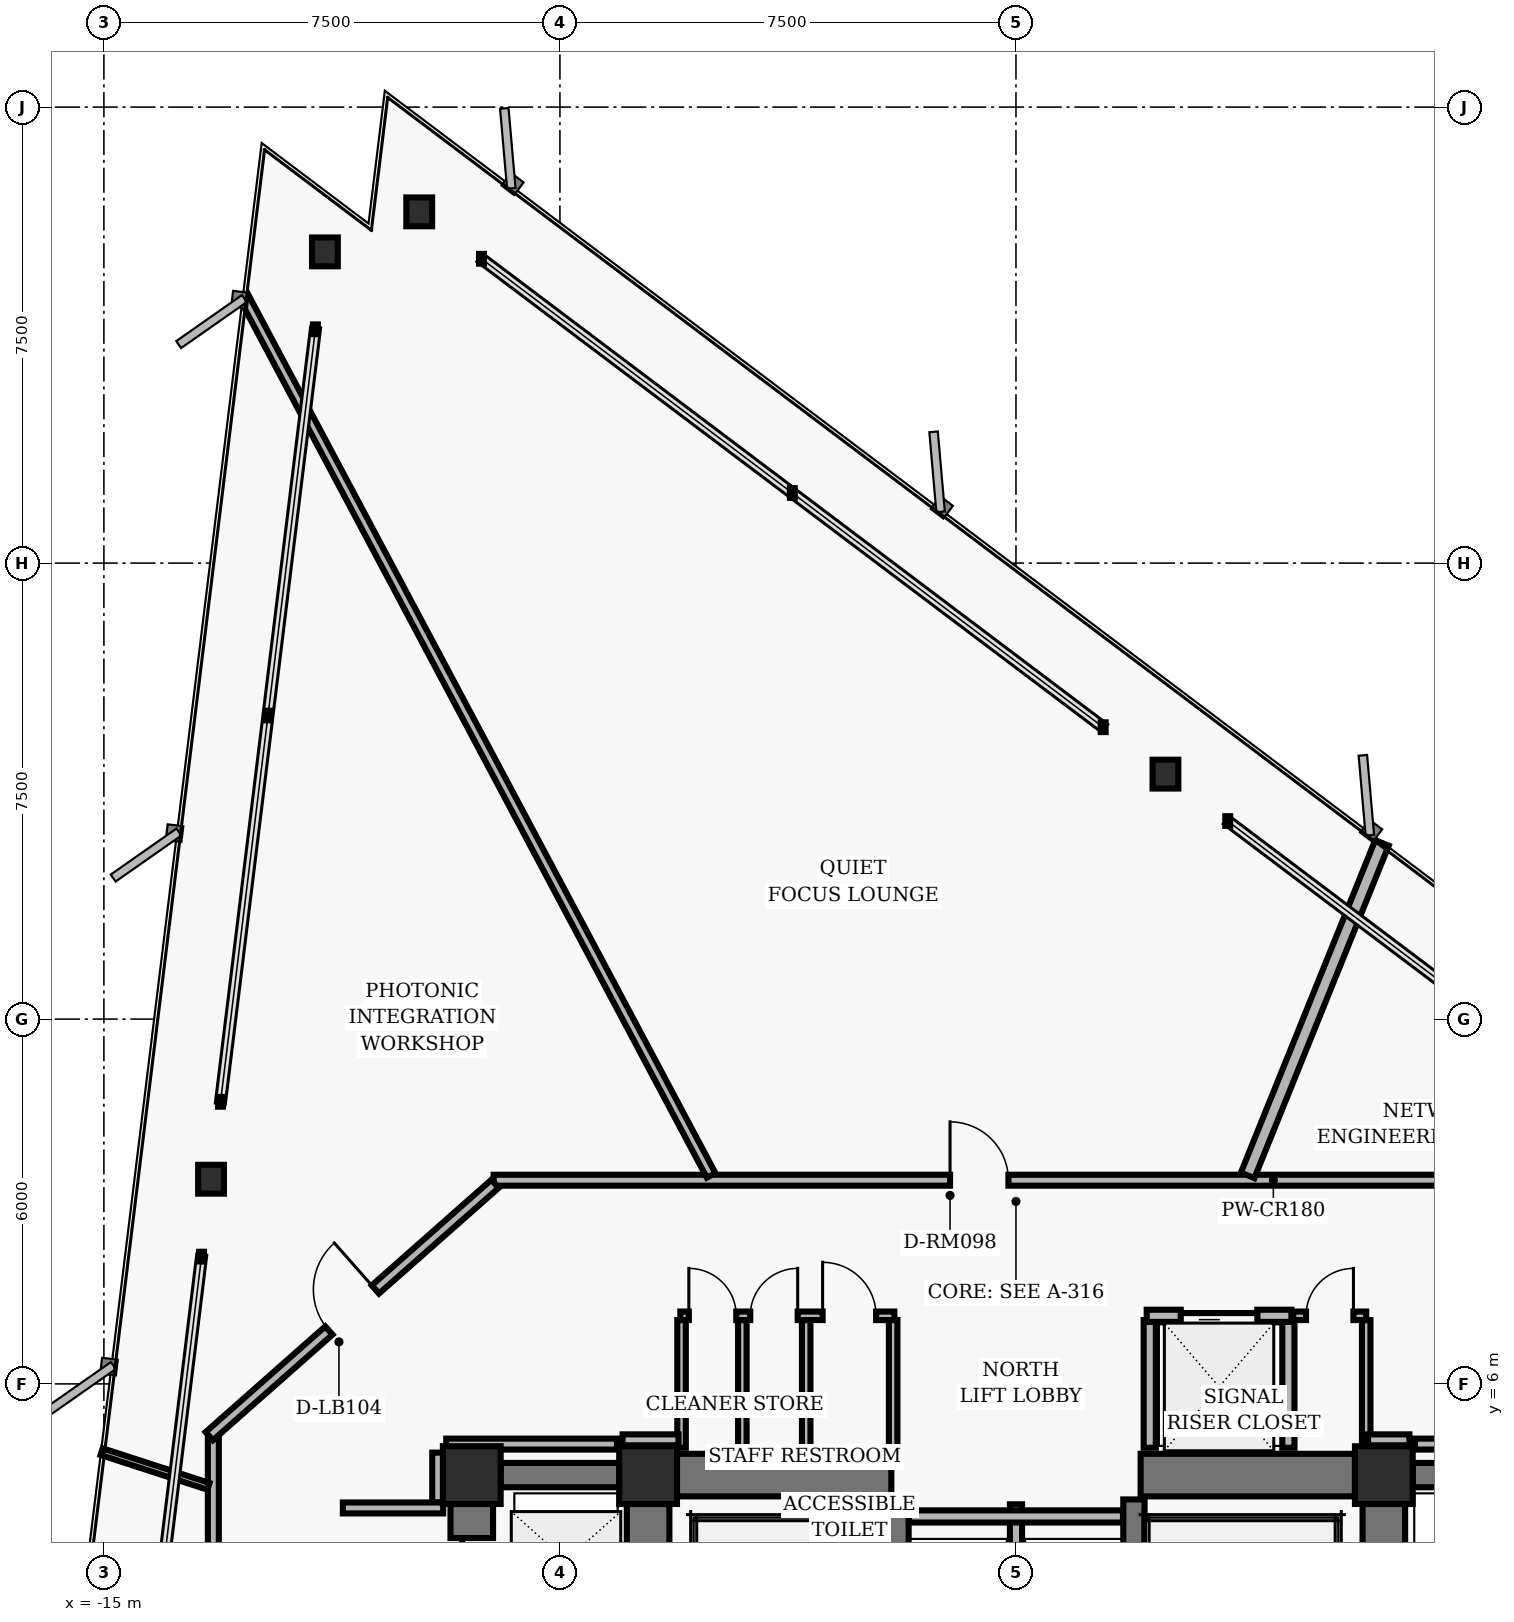
"""IFC4 building model, lengths in metres.
Left out: names, types, materials, properties, quantities, classifications, styles, units other than length and angle.
Written with IfcOpenShell. Run it as: python <this file> out.ifc"""

import sys

from ifc_helpers import new_model, si_unit, direction, frame, frame_2d, origin, origin_2d, place, context, subcontext, project, spatial, rectangle, hollow_rectangle, i_section, extrude, element, fill, save


model = new_model("IFC4")
c1 = context("Model", 3, precision=1e-05, world=origin(), true_north=direction((0.0, 1.0)))
c2 = subcontext(c1, "Body", "Model", "MODEL_VIEW")
j1 = project(units=[si_unit("LENGTHUNIT", "METRE"), si_unit("PLANEANGLEUNIT", "RADIAN")], contexts=[c1])
p1 = place(None, origin())
s1 = spatial("IfcSite", under=j1, at=p1, CompositionType="ELEMENT")
p2 = place(p1, origin())
s2 = spatial("IfcBuilding", under=s1, at=p2, CompositionType="ELEMENT")
p3 = place(p2, frame((0.0, 0.0, 52.96)))
s3 = spatial("IfcBuildingStorey", under=s2, at=p3, CompositionType="ELEMENT", Elevation=52.96)
for number, where, z_axis, x_axis in (
    (1, (-6.05, 4.5, 0.0), (0.0, 0.0, 1.0), (1.0, 0.0, 0.0)),
    (2, (6.05, 4.5, 0.0), (0.0, 0.0, 1.0), (1.0, 0.0, 0.0)),
    (3, (-8.95, 4.5, 0.0), (0.0, 0.0, 1.0), (1.0, 0.0, 0.0)),
):
    element("IfcColumn", number, at=place(p3, frame(where, z_axis=z_axis, x_axis=x_axis)), inside=s3, PredefinedType="COLUMN", context=c2, shape_type="SweptSolid", body=[
        extrude(hollow_rectangle(XDim=0.95, YDim=0.95, WallThickness=0.06, InnerFilletRadius=0.02, OuterFilletRadius=0.04, at=origin_2d()), origin(), (0.0, 0.0, 1.0), 3.36),
    ])
for number, where, z_axis, x_axis in (
    (4, (-6.05, 0.475, 0.0), (0.0, 0.0, 1.0), (0.0, 1.0, 0.0)),
    (5, (6.05, 0.475, 0.0), (0.0, 0.0, 1.0), (0.0, 1.0, 0.0)),
):
    element("IfcWall", number, at=place(p3, frame(where, z_axis=z_axis, x_axis=x_axis)), inside=s3, PredefinedType="SHEAR", context=c2, shape_type="SweptSolid", body=[
        extrude(rectangle(XDim=3.55, YDim=0.7, at=frame_2d((1.775, 0.0))), origin(), (0.0, 0.0, 1.0), 3.098),
    ])
for number, where, z_axis, x_axis in (
    (6, (-1.94, -4.1, 0.0), (0.0, 0.0, 1.0), (0.0, 1.0, 0.0)),
    (7, (1.94, -4.1, 0.0), (0.0, 0.0, 1.0), (0.0, 1.0, 0.0)),
):
    element("IfcWall", number, at=place(p3, frame(where, z_axis=z_axis, x_axis=x_axis)), inside=s3, PredefinedType="SHEAR", context=c2, shape_type="SweptSolid", body=[
        extrude(rectangle(XDim=8.2, YDim=0.35, at=frame_2d((4.1, 0.0))), origin(), (0.0, 0.0, 1.0), 3.098),
    ])
for number, where, z_axis, x_axis in (
    (8, (-5.575, 4.5, 0.0), (0.0, 0.0, 1.0), (1.0, 0.0, 0.0)),
    (9, (2.05, 4.5, 0.0), (0.0, 0.0, 1.0), (1.0, 0.0, 0.0)),
):
    element("IfcWall", number, at=place(p3, frame(where, z_axis=z_axis, x_axis=x_axis)), inside=s3, PredefinedType="SHEAR", context=c2, shape_type="SweptSolid", body=[
        extrude(rectangle(XDim=3.525, YDim=0.7, at=frame_2d((1.762, 0.0))), origin(), (0.0, 0.0, 1.0), 3.098),
    ])
p4 = place(p3, frame((-8.95, -3.825, 0.0), z_axis=(0.0, 0.0, 1.0), x_axis=(0.0, 1.0, 0.0)))
e10 = element("IfcWall", 10, at=p4, inside=s3, PredefinedType="SHEAR", context=c2, shape_type="SweptSolid", body=[
    extrude(rectangle(XDim=7.85, YDim=0.7, at=frame_2d((3.925, 0.0))), origin(), (0.0, 0.0, 1.0), 3.098),
])
p5 = place(p4, frame((0.55, 0.0, 0.0)))
e11 = element("IfcOpeningElement", 11, at=p5, cuts=e10, PredefinedType="OPENING", context=c2, shape_type="SweptSolid", body=[
    extrude(rectangle(XDim=1.06, YDim=2.04, at=frame_2d((0.53, 1.02))), frame((0.0, 0.36, 0.0), z_axis=(0.0, -1.0, 0.0), x_axis=(1.0, 0.0, 0.0)), (0.0, 0.0, 1.0), 0.72),
])
p6 = place(p4, frame((3.395, 0.0, 0.0)))
e12 = element("IfcOpeningElement", 12, at=p6, cuts=e10, PredefinedType="OPENING", context=c2, shape_type="SweptSolid", body=[
    extrude(rectangle(XDim=1.06, YDim=2.04, at=frame_2d((0.53, 1.02))), frame((0.0, 0.36, 0.0), z_axis=(0.0, -1.0, 0.0), x_axis=(1.0, 0.0, 0.0)), (0.0, 0.0, 1.0), 0.72),
])
p7 = place(p4, frame((6.23, 0.0, 0.0)))
e13 = element("IfcOpeningElement", 13, at=p7, cuts=e10, PredefinedType="OPENING", context=c2, shape_type="SweptSolid", body=[
    extrude(rectangle(XDim=1.06, YDim=2.04, at=frame_2d((0.53, 1.02))), frame((0.0, 0.36, 0.0), z_axis=(0.0, -1.0, 0.0), x_axis=(1.0, 0.0, 0.0)), (0.0, 0.0, 1.0), 0.72),
])
for number, where, z_axis, x_axis in (
    (14, (-8.475, 4.5, 0.0), (0.0, 0.0, 1.0), (1.0, 0.0, 0.0)),
    (15, (6.525, 4.5, 0.0), (0.0, 0.0, 1.0), (1.0, 0.0, 0.0)),
):
    element("IfcWall", number, at=place(p3, frame(where, z_axis=z_axis, x_axis=x_axis)), inside=s3, PredefinedType="SHEAR", context=c2, shape_type="SweptSolid", body=[
        extrude(rectangle(XDim=1.95, YDim=0.4, at=frame_2d((0.975, 0.0))), origin(), (0.0, 0.0, 1.0), 3.098),
    ])
for number, where, z_axis, x_axis in (
    (16, (2.458, 16.029, 0.0), (0.0, 0.0, 1.0), (1.0, 0.0, 0.0)),
    (17, (-9.814, 25.277, 0.0), (0.0, 0.0, 1.0), (1.0, 0.0, 0.0)),
    (18, (-11.365, 24.619, 0.0), (0.0, 0.0, 1.0), (1.0, 0.0, 0.0)),
    (19, (-13.238, 9.366, 0.0), (0.0, 0.0, 1.0), (1.0, 0.0, 0.0)),
):
    element("IfcColumn", number, at=place(p3, frame(where, z_axis=z_axis, x_axis=x_axis)), inside=s3, PredefinedType="COLUMN", context=c2, shape_type="SweptSolid", body=[
        extrude(i_section(OverallWidth=0.424, OverallDepth=0.474, WebThickness=0.048, FlangeThickness=0.077, FilletRadius=0.025, at=origin_2d()), origin(), (0.0, 0.0, 1.0), 3.36),
    ])
p8 = place(p3, frame((0.0, 1.25, 0.0), z_axis=(0.0, 0.0, 1.0), x_axis=(0.0, 1.0, 0.0)))
e20 = element("IfcWall", 20, at=p8, inside=s3, PredefinedType="PARTITIONING", context=c2, shape_type="SweptSolid", body=[
    extrude(rectangle(XDim=2.77, YDim=0.2, at=frame_2d((1.385, 0.0))), origin(), (0.0, 0.0, 1.0), 3.073),
])
p9 = place(p3, frame((-1.76, 3.82, 0.0), z_axis=(0.0, 0.0, 1.0), x_axis=(1.0, 0.0, 0.0)))
e21 = element("IfcWall", 21, at=p9, inside=s3, PredefinedType="PARTITIONING", context=c2, shape_type="SweptSolid", body=[
    extrude(rectangle(XDim=3.52, YDim=0.2, at=frame_2d((1.76, 0.0))), origin(), (0.0, 0.0, 1.0), 3.073),
])
for number, where, z_axis, x_axis in (
    (22, (2.2, 4.95, 0.0), (0.0, 0.0, 1.0), (0.0, 1.0, 0.0)),
    (23, (4.48, 4.95, 0.0), (0.0, 0.0, 1.0), (0.0, 1.0, 0.0)),
):
    element("IfcWall", number, at=place(p3, frame(where, z_axis=z_axis, x_axis=x_axis)), inside=s3, PredefinedType="PARTITIONING", context=c2, shape_type="SweptSolid", body=[
        extrude(rectangle(XDim=2.1, YDim=0.2, at=frame_2d((1.05, 0.0))), origin(), (0.0, 0.0, 1.0), 3.073),
    ])
p10 = place(p3, frame((2.15, 7.12, 0.0), z_axis=(0.0, 0.0, 1.0), x_axis=(1.0, 0.0, 0.0)))
e24 = element("IfcWall", 24, at=p10, inside=s3, PredefinedType="PARTITIONING", context=c2, shape_type="SweptSolid", body=[
    extrude(rectangle(XDim=2.38, YDim=0.2, at=frame_2d((1.19, 0.0))), origin(), (0.0, 0.0, 1.0), 2.587),
])
p11 = place(p10, frame((0.56, 0.0, 0.0)))
e25 = element("IfcOpeningElement", 25, at=p11, cuts=e24, PredefinedType="OPENING", context=c2, shape_type="SweptSolid", body=[
    extrude(rectangle(XDim=1.26, YDim=2.06, at=frame_2d((0.63, 1.03))), frame((0.0, 0.11, 0.0), z_axis=(0.0, -1.0, 0.0), x_axis=(1.0, 0.0, 0.0)), (0.0, 0.0, 1.0), 0.22),
])
for number, where, z_axis, x_axis in (
    (26, (-5.5, 4.95, 0.0), (0.0, 0.0, 1.0), (0.0, 1.0, 0.0)),
    (27, (-4.5, 4.95, 0.0), (0.0, 0.0, 1.0), (0.0, 1.0, 0.0)),
    (28, (-3.45, 4.95, 0.0), (0.0, 0.0, 1.0), (0.0, 1.0, 0.0)),
    (29, (-2.02, 4.95, 0.0), (0.0, 0.0, 1.0), (0.0, 1.0, 0.0)),
):
    element("IfcWall", number, at=place(p3, frame(where, z_axis=z_axis, x_axis=x_axis)), inside=s3, PredefinedType="PARTITIONING", context=c2, shape_type="SweptSolid", body=[
        extrude(rectangle(XDim=2.1, YDim=0.14, at=frame_2d((1.05, 0.0))), origin(), (0.0, 0.0, 1.0), 3.073),
    ])
p12 = place(p3, frame((-5.52, 7.12, 0.0), z_axis=(0.0, 0.0, 1.0), x_axis=(1.0, 0.0, 0.0)))
e30 = element("IfcWall", 30, at=p12, inside=s3, PredefinedType="PARTITIONING", context=c2, shape_type="SweptSolid", body=[
    extrude(rectangle(XDim=3.52, YDim=0.14, at=frame_2d((1.76, 0.0))), origin(), (0.0, 0.0, 1.0), 3.073),
])
p13 = place(p12, frame((0.14, 0.0, 0.0)))
e31 = element("IfcOpeningElement", 31, at=p13, cuts=e30, PredefinedType="OPENING", context=c2, shape_type="SweptSolid", body=[
    extrude(rectangle(XDim=0.78, YDim=2.01, at=frame_2d((0.39, 1.005))), frame((0.0, 0.08, 0.0), z_axis=(0.0, -1.0, 0.0), x_axis=(1.0, 0.0, 0.0)), (0.0, 0.0, 1.0), 0.16),
])
p14 = place(p12, frame((1.15, 0.0, 0.0)))
e32 = element("IfcOpeningElement", 32, at=p14, cuts=e30, PredefinedType="OPENING", context=c2, shape_type="SweptSolid", body=[
    extrude(rectangle(XDim=0.78, YDim=2.01, at=frame_2d((0.39, 1.005))), frame((0.0, 0.08, 0.0), z_axis=(0.0, -1.0, 0.0), x_axis=(1.0, 0.0, 0.0)), (0.0, 0.0, 1.0), 0.16),
])
p15 = place(p12, frame((2.34, 0.0, 0.0)))
e33 = element("IfcOpeningElement", 33, at=p15, cuts=e30, PredefinedType="OPENING", context=c2, shape_type="SweptSolid", body=[
    extrude(rectangle(XDim=0.88, YDim=2.02, at=frame_2d((0.44, 1.01))), frame((0.0, 0.08, 0.0), z_axis=(0.0, -1.0, 0.0), x_axis=(1.0, 0.0, 0.0)), (0.0, 0.0, 1.0), 0.16),
])
p16 = place(p3, frame((5.76, 4.95, 0.0), z_axis=(0.0, 0.0, 1.0), x_axis=(0.0, 1.0, 0.0)))
e34 = element("IfcWall", 34, at=p16, inside=s3, PredefinedType="PARTITIONING", context=c2, shape_type="SweptSolid", body=[
    extrude(rectangle(XDim=2.1, YDim=0.14, at=frame_2d((1.05, 0.0))), origin(), (0.0, 0.0, 1.0), 3.073),
])
p17 = place(p3, frame((4.56, 7.12, 0.0), z_axis=(0.0, 0.0, 1.0), x_axis=(1.0, 0.0, 0.0)))
e35 = element("IfcWall", 35, at=p17, inside=s3, PredefinedType="PARTITIONING", context=c2, shape_type="SweptSolid", body=[
    extrude(rectangle(XDim=1.2, YDim=0.14, at=frame_2d((0.6, 0.0))), origin(), (0.0, 0.0, 1.0), 2.587),
])
p18 = place(p17, frame((0.21, 0.0, 0.0)))
e36 = element("IfcOpeningElement", 36, at=p18, cuts=e35, PredefinedType="OPENING", context=c2, shape_type="SweptSolid", body=[
    extrude(rectangle(XDim=0.78, YDim=2.01, at=frame_2d((0.39, 1.005))), frame((0.0, 0.08, 0.0), z_axis=(0.0, -1.0, 0.0), x_axis=(1.0, 0.0, 0.0)), (0.0, 0.0, 1.0), 0.16),
])
p19 = place(p3, frame((-8.59, 9.35, 0.0), z_axis=(0.0, 0.0, 1.0), x_axis=(1.0, 0.0, 0.0)))
e37 = element("IfcWall", 37, at=p19, inside=s3, PredefinedType="PARTITIONING", context=c2, shape_type="SweptSolid", body=[
    extrude(rectangle(XDim=17.18, YDim=0.18, at=frame_2d((8.59, 0.0))), origin(), (0.0, 0.0, 1.0), 3.073),
])
p20 = place(p19, frame((7.506, 0.0, 0.0)))
e38 = element("IfcOpeningElement", 38, at=p20, cuts=e37, PredefinedType="OPENING", context=c2, shape_type="SweptSolid", body=[
    extrude(rectangle(XDim=0.96, YDim=2.02, at=frame_2d((0.48, 1.01))), frame((0.0, 0.1, 0.0), z_axis=(0.0, -1.0, 0.0), x_axis=(1.0, 0.0, 0.0)), (0.0, 0.0, 1.0), 0.2),
])
p21 = place(p3, frame((-13.2, -5.11, 0.0), z_axis=(0.0, 0.0, 1.0), x_axis=(0.0, 1.0, 0.0)))
e39 = element("IfcWall", 39, at=p21, inside=s3, PredefinedType="PARTITIONING", context=c2, shape_type="SweptSolid", body=[
    extrude(rectangle(XDim=10.22, YDim=0.18, at=frame_2d((5.11, 0.0))), origin(), (0.0, 0.0, 1.0), 2.587),
])
p22 = place(p21, frame((5.132, 0.0, 0.0)))
e40 = element("IfcOpeningElement", 40, at=p22, cuts=e39, PredefinedType="OPENING", context=c2, shape_type="SweptSolid", body=[
    extrude(rectangle(XDim=0.96, YDim=2.02, at=frame_2d((0.48, 1.01))), frame((0.0, 0.1, 0.0), z_axis=(0.0, -1.0, 0.0), x_axis=(1.0, 0.0, 0.0)), (0.0, 0.0, 1.0), 0.2),
])
p23 = place(p3, frame((-13.268, 5.14, 0.0), z_axis=(0.0, 0.0, 1.0), x_axis=(0.749626463267, 0.66186113768, 0.0)))
e41 = element("IfcWall", 41, at=p23, inside=s3, PredefinedType="PARTITIONING", context=c2, shape_type="SweptSolid", body=[
    extrude(rectangle(XDim=6.27, YDim=0.18, at=frame_2d((3.135, 0.0))), origin(), (0.0, 0.0, 1.0), 3.073),
])
p24 = place(p23, frame((2.625, 0.0, 0.0)))
e42 = element("IfcOpeningElement", 42, at=p24, cuts=e41, PredefinedType="OPENING", context=c2, shape_type="SweptSolid", body=[
    extrude(rectangle(XDim=1.02, YDim=2.02, at=frame_2d((0.51, 1.01))), frame((0.0, 0.1, 0.0), z_axis=(0.0, -1.0, 0.0), x_axis=(1.0, 0.0, 0.0)), (0.0, 0.0, 1.0), 0.2),
])
p25 = place(p3, frame((-9.51, 4.87, 0.0), z_axis=(0.0, 0.0, 1.0), x_axis=(0.0, -1.0, 0.0)))
e43 = element("IfcWall", 43, at=p25, inside=s3, PredefinedType="PARTITIONING", context=c2, shape_type="SweptSolid", body=[
    extrude(rectangle(XDim=0.82, YDim=0.18, at=frame_2d((0.41, 0.0))), origin(), (0.0, 0.0, 1.0), 3.073),
])
p26 = place(p3, frame((-9.42, 3.96, 0.0), z_axis=(0.0, 0.0, 1.0), x_axis=(-1.0, 0.0, 0.0)))
e44 = element("IfcWall", 44, at=p26, inside=s3, PredefinedType="PARTITIONING", context=c2, shape_type="SweptSolid", body=[
    extrude(rectangle(XDim=1.65, YDim=0.18, at=frame_2d((0.825, 0.0))), origin(), (0.0, 0.0, 1.0), 3.073),
])
p27 = place(p3, frame((9.37, 5.01, 0.0), z_axis=(0.0, 0.0, 1.0), x_axis=(-1.0, 0.0, 0.0)))
e45 = element("IfcWall", 45, at=p27, inside=s3, PredefinedType="PARTITIONING", context=c2, shape_type="SweptSolid", body=[
    extrude(rectangle(XDim=2.808, YDim=0.18, at=frame_2d((1.404, 0.0))), origin(), (0.0, 0.0, 1.0), 3.073),
])
p28 = place(p3, frame((6.47, 5.08, 0.0), z_axis=(0.0, 0.0, 1.0), x_axis=(-1.0, 0.0, 0.0)))
e46 = element("IfcWall", 46, at=p28, inside=s3, PredefinedType="PARTITIONING", context=c2, shape_type="SweptSolid", body=[
    extrude(rectangle(XDim=0.68, YDim=0.18, at=frame_2d((0.34, 0.0))), origin(), (0.0, 0.0, 1.0), 3.073),
])
p29 = place(p3, frame((-5.55, 5.08, 0.0), z_axis=(0.0, 0.0, 1.0), x_axis=(-1.0, 0.0, 0.0)))
e47 = element("IfcWall", 47, at=p29, inside=s3, PredefinedType="PARTITIONING", context=c2, shape_type="SweptSolid", body=[
    extrude(rectangle(XDim=0.92, YDim=0.18, at=frame_2d((0.46, 0.0))), origin(), (0.0, 0.0, 1.0), 3.073),
])
p30 = place(p3, frame((-6.562, 5.01, 0.0), z_axis=(0.0, 0.0, 1.0), x_axis=(-1.0, 0.0, 0.0)))
e48 = element("IfcWall", 48, at=p30, inside=s3, PredefinedType="PARTITIONING", context=c2, shape_type="SweptSolid", body=[
    extrude(rectangle(XDim=2.808, YDim=0.18, at=frame_2d((1.404, 0.0))), origin(), (0.0, 0.0, 1.0), 3.073),
])
p31 = place(p3, frame((3.81, 9.43, 0.0), z_axis=(0.0, 0.0, 1.0), x_axis=(0.374593091461, 0.927189309596, 0.0)))
e49 = element("IfcWall", 49, at=p31, inside=s3, PredefinedType="PARTITIONING", context=c2, shape_type="SweptSolid", body=[
    extrude(rectangle(XDim=5.898, YDim=0.24, at=frame_2d((2.949, 0.0))), origin(), (0.0, 0.0, 1.0), 3.073),
])
p32 = place(p3, frame((-5.014, 9.43, 0.0), z_axis=(0.0, 0.0, 1.0), x_axis=(-0.469473054772, 0.882946799554, 0.0)))
e50 = element("IfcWall", 50, at=p32, inside=s3, PredefinedType="PARTITIONING", context=c2, shape_type="SweptSolid", body=[
    extrude(rectangle(XDim=16.379, YDim=0.16, at=frame_2d((8.19, 0.0))), origin(), (0.0, 0.0, 1.0), 3.073),
])
p33 = place(p3, frame((-13.28, 4.315, 0.0), z_axis=(0.0, 0.0, 1.0), x_axis=(-0.951047661396, 0.309044245624, 0.0)))
e51 = element("IfcWall", 51, at=p33, inside=s3, PredefinedType="MOVABLE", context=c2, shape_type="SweptSolid", body=[
    extrude(rectangle(XDim=1.848, YDim=0.115, at=frame_2d((0.924, 0.0))), origin(), (0.0, 0.0, 1.0), 3.073),
])
p34 = place(p11, origin())
e52 = element("IfcDoor", 52, at=p34, inside=s3, OperationType="SLIDING_TO_LEFT", PredefinedType="DOOR", context=c2, shape_type="SweptSolid", body=[
    extrude(rectangle(XDim=1.26, YDim=2.06, at=frame_2d((0.63, 1.03))), frame((0.0, 0.025, 0.0), z_axis=(0.0, -1.0, 0.0), x_axis=(1.0, 0.0, 0.0)), (0.0, 0.0, 1.0), 0.05),
])
fill(e25, e52)
p35 = place(p13, origin())
e53 = element("IfcDoor", 53, at=p35, inside=s3, OperationType="SINGLE_SWING_LEFT", PredefinedType="DOOR", context=c2, shape_type="SweptSolid", body=[
    extrude(rectangle(XDim=0.78, YDim=2.01, at=frame_2d((0.39, 1.005))), frame((0.0, 0.025, 0.0), z_axis=(0.0, -1.0, 0.0), x_axis=(1.0, 0.0, 0.0)), (0.0, 0.0, 1.0), 0.05),
])
fill(e31, e53)
p36 = place(p14, origin())
e54 = element("IfcDoor", 54, at=p36, inside=s3, OperationType="SINGLE_SWING_RIGHT", PredefinedType="DOOR", context=c2, shape_type="SweptSolid", body=[
    extrude(rectangle(XDim=0.78, YDim=2.01, at=frame_2d((0.39, 1.005))), frame((0.0, 0.025, 0.0), z_axis=(0.0, -1.0, 0.0), x_axis=(1.0, 0.0, 0.0)), (0.0, 0.0, 1.0), 0.05),
])
fill(e32, e54)
p37 = place(p15, origin())
e55 = element("IfcDoor", 55, at=p37, inside=s3, OperationType="SINGLE_SWING_LEFT", PredefinedType="DOOR", context=c2, shape_type="SweptSolid", body=[
    extrude(rectangle(XDim=0.88, YDim=2.02, at=frame_2d((0.44, 1.01))), frame((0.0, 0.025, 0.0), z_axis=(0.0, -1.0, 0.0), x_axis=(1.0, 0.0, 0.0)), (0.0, 0.0, 1.0), 0.05),
])
fill(e33, e55)
p38 = place(p18, origin())
e56 = element("IfcDoor", 56, at=p38, inside=s3, OperationType="SINGLE_SWING_RIGHT", PredefinedType="DOOR", context=c2, shape_type="SweptSolid", body=[
    extrude(rectangle(XDim=0.78, YDim=2.01, at=frame_2d((0.39, 1.005))), frame((0.0, 0.025, 0.0), z_axis=(0.0, -1.0, 0.0), x_axis=(1.0, 0.0, 0.0)), (0.0, 0.0, 1.0), 0.05),
])
fill(e36, e56)
p39 = place(p7, origin())
e57 = element("IfcDoor", 57, at=p39, inside=s3, OperationType="SLIDING_TO_LEFT", PredefinedType="DOOR", context=c2, shape_type="SweptSolid", body=[
    extrude(rectangle(XDim=1.06, YDim=2.04, at=frame_2d((0.53, 1.02))), frame((0.0, 0.025, 0.0), z_axis=(0.0, -1.0, 0.0), x_axis=(1.0, 0.0, 0.0)), (0.0, 0.0, 1.0), 0.05),
])
fill(e13, e57)
p40 = place(p20, origin())
e58 = element("IfcDoor", 58, at=p40, inside=s3, OperationType="SINGLE_SWING_LEFT", PredefinedType="DOOR", context=c2, shape_type="SweptSolid", body=[
    extrude(rectangle(XDim=0.96, YDim=2.02, at=frame_2d((0.48, 1.01))), frame((0.0, 0.025, 0.0), z_axis=(0.0, -1.0, 0.0), x_axis=(1.0, 0.0, 0.0)), (0.0, 0.0, 1.0), 0.05),
])
fill(e38, e58)
p41 = place(p24, origin())
e59 = element("IfcDoor", 59, at=p41, inside=s3, OperationType="SINGLE_SWING_RIGHT", PredefinedType="DOOR", context=c2, shape_type="SweptSolid", body=[
    extrude(rectangle(XDim=1.02, YDim=2.02, at=frame_2d((0.51, 1.01))), frame((0.0, 0.025, 0.0), z_axis=(0.0, -1.0, 0.0), x_axis=(1.0, 0.0, 0.0)), (0.0, 0.0, 1.0), 0.05),
])
fill(e42, e59)
save(model, sys.argv[1])
